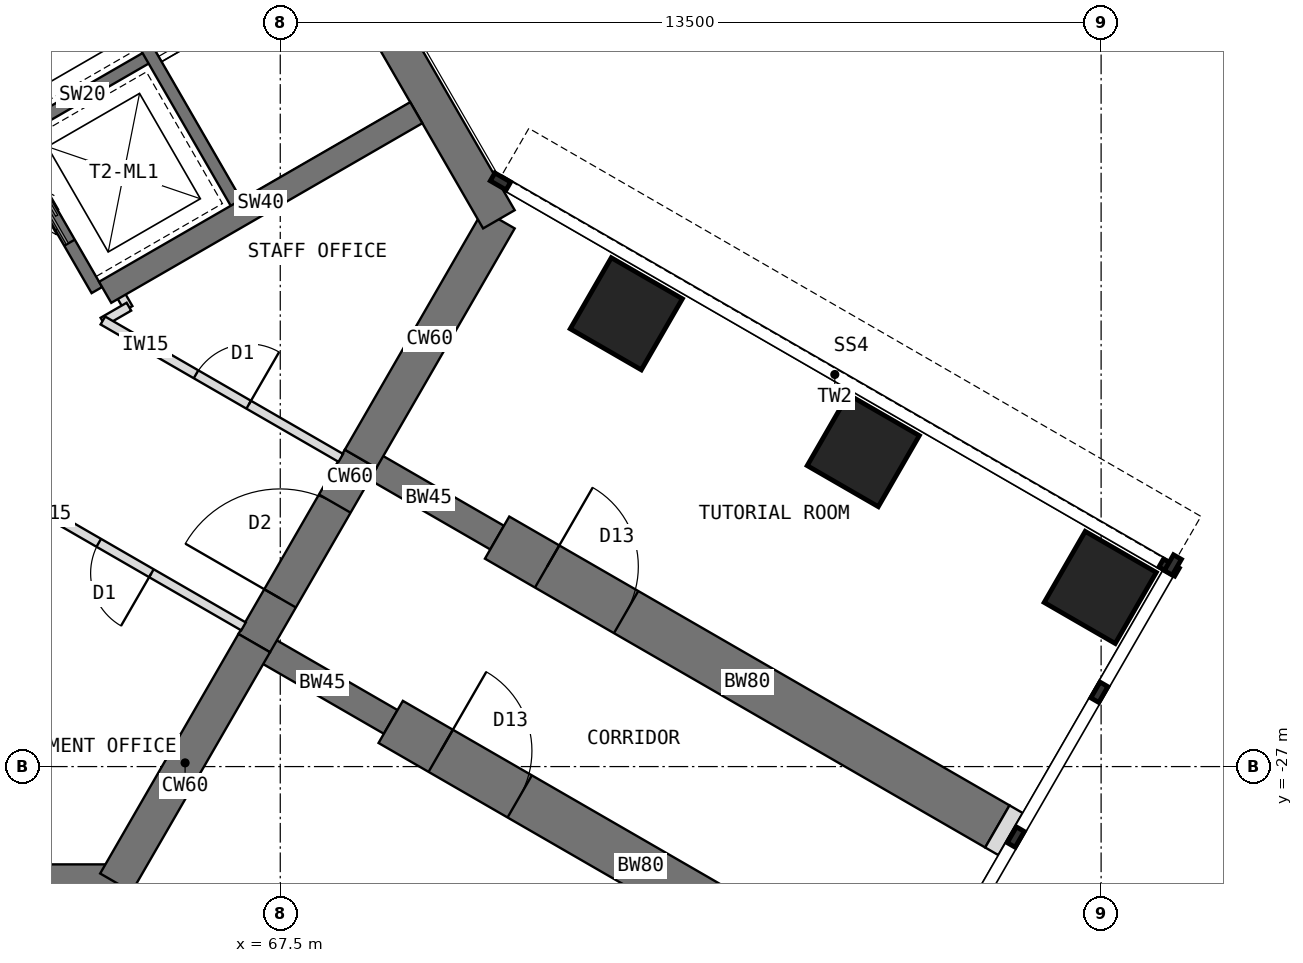
"""IFC4 building model, lengths in metres.
Left out: names, types, materials, properties, quantities, classifications, styles, units other than length and angle.
Written with IfcOpenShell. Run it as: python <this file> out.ifc"""

import sys

from ifc_helpers import new_model, si_unit, direction, frame, frame_2d, origin, origin_2d, place, context, subcontext, project, spatial, rectangle, extrude, element, fill, save


model = new_model("IFC4")
c1 = context("Model", 3, precision=1e-05, world=origin(), true_north=direction((0.0, 1.0)))
c2 = subcontext(c1, "Body", "Model", "MODEL_VIEW")
j1 = project(units=[si_unit("LENGTHUNIT", "METRE"), si_unit("PLANEANGLEUNIT", "RADIAN")], contexts=[c1])
p1 = place(None, origin())
s1 = spatial("IfcSite", under=j1, at=p1, CompositionType="ELEMENT")
p2 = place(p1, origin())
s2 = spatial("IfcBuilding", under=s1, at=p2, CompositionType="ELEMENT")
p3 = place(p2, frame((0.0, 0.0, 101.5)))
s3 = spatial("IfcBuildingStorey", under=s2, at=p3, CompositionType="ELEMENT", Elevation=101.5)
p4 = place(p3, frame((52.202, -28.908, 0.0), z_axis=(0.0, 0.0, 1.0), x_axis=(1.0, 0.0, 0.0)))
e1 = element("IfcWall", 1, at=p4, inside=s3, PredefinedType="SHEAR", context=c2, shape_type="SweptSolid", body=[
    extrude(rectangle(XDim=12.596, YDim=0.6, at=frame_2d((6.298, 0.0))), origin(), (0.0, 0.0, 1.0), 4.0),
])
p5 = place(p3, frame((64.798, -28.908, 0.0), z_axis=(0.0, 0.0, 1.0), x_axis=(0.499984222037, 0.866034513004, 0.0)))
e2 = element("IfcWall", 2, at=p5, inside=s3, PredefinedType="SHEAR", context=c2, shape_type="SweptSolid", body=[
    extrude(rectangle(XDim=4.548, YDim=0.6, at=frame_2d((2.274, 0.0))), origin(), (0.0, 0.0, 1.0), 4.0),
])
p6 = place(p3, frame((67.072, -24.97, 0.0), z_axis=(0.0, 0.0, 1.0), x_axis=(0.500010275428, 0.866019471182, 0.0)))
e3 = element("IfcWall", 3, at=p6, inside=s3, PredefinedType="SHEAR", context=c2, shape_type="SweptSolid", body=[
    extrude(rectangle(XDim=3.5, YDim=0.6, at=frame_2d((1.75, 0.0))), origin(), (0.0, 0.0, 1.0), 4.0),
])
p7 = place(p6, frame((0.85, 0.0, 0.0)))
e4 = element("IfcOpeningElement", 4, at=p7, cuts=e3, PredefinedType="OPENING", context=c2, shape_type="SweptSolid", body=[
    extrude(rectangle(XDim=1.8, YDim=2.1, at=frame_2d((0.9, 1.05))), frame((0.0, 0.31, 0.0), z_axis=(0.0, -1.0, 0.0), x_axis=(1.0, 0.0, 0.0)), (0.0, 0.0, 1.0), 0.62),
])
p8 = place(p3, frame((68.822, -21.939, 0.0), z_axis=(0.0, 0.0, 1.0), x_axis=(0.500024481964, 0.866011268655, 0.0)))
e5 = element("IfcWall", 5, at=p8, inside=s3, PredefinedType="SHEAR", context=c2, shape_type="SweptSolid", body=[
    extrude(rectangle(XDim=4.548, YDim=0.6, at=frame_2d((2.274, 0.0))), origin(), (0.0, 0.0, 1.0), 4.0),
])
p9 = place(p3, frame((71.096, -18.0, 0.0), z_axis=(0.0, 0.0, 1.0), x_axis=(-0.500005998175, 0.866021940709, 0.0)))
e6 = element("IfcWall", 6, at=p9, inside=s3, PredefinedType="SHEAR", context=c2, shape_type="SweptSolid", body=[
    extrude(rectangle(XDim=12.596, YDim=0.6, at=frame_2d((6.298, 0.0))), origin(), (0.0, 0.0, 1.0), 4.0),
])
p10 = place(p3, frame((68.822, -21.939, 0.0), z_axis=(0.0, 0.0, 1.0), x_axis=(0.866072649678, -0.499918158782, 0.0)))
e7 = element("IfcWall", 7, at=p10, inside=s3, PredefinedType="SHEAR", context=c2, shape_type="SweptSolid", body=[
    extrude(rectangle(XDim=2.592, YDim=0.45, at=frame_2d((1.296, 0.0))), origin(), (0.0, 0.0, 1.0), 4.0),
])
p11 = place(p3, frame((71.066, -23.234, 0.0), z_axis=(0.0, 0.0, 1.0), x_axis=(0.86602681393, -0.499997557548, 0.0)))
e8 = element("IfcWall", 8, at=p11, inside=s3, PredefinedType="SHEAR", context=c2, shape_type="SweptSolid", body=[
    extrude(rectangle(XDim=9.5, YDim=0.8, at=frame_2d((4.75, 0.0))), origin(), (0.0, 0.0, 1.0), 4.0),
])
p12 = place(p11, frame((0.95, 0.0, 0.0)))
e9 = element("IfcOpeningElement", 9, at=p12, cuts=e8, PredefinedType="OPENING", context=c2, shape_type="SweptSolid", body=[
    extrude(rectangle(XDim=1.5, YDim=2.1, at=frame_2d((0.75, 1.05))), frame((0.0, 0.41, 0.0), z_axis=(0.0, -1.0, 0.0), x_axis=(1.0, 0.0, 0.0)), (0.0, 0.0, 1.0), 0.82),
])
p13 = place(p3, frame((67.072, -24.97, 0.0), z_axis=(0.0, 0.0, 1.0), x_axis=(0.866031863473, -0.499988811324, 0.0)))
e10 = element("IfcWall", 10, at=p13, inside=s3, PredefinedType="SHEAR", context=c2, shape_type="SweptSolid", body=[
    extrude(rectangle(XDim=2.592, YDim=0.45, at=frame_2d((1.296, 0.0))), origin(), (0.0, 0.0, 1.0), 4.0),
])
p14 = place(p3, frame((69.316, -26.266, 0.0), z_axis=(0.0, 0.0, 1.0), x_axis=(0.86602681393, -0.499997557548, 0.0)))
e11 = element("IfcWall", 11, at=p14, inside=s3, PredefinedType="SHEAR", context=c2, shape_type="SweptSolid", body=[
    extrude(rectangle(XDim=9.5, YDim=0.8, at=frame_2d((4.75, 0.0))), origin(), (0.0, 0.0, 1.0), 4.0),
])
p15 = place(p14, frame((0.95, 0.0, 0.0)))
e12 = element("IfcOpeningElement", 12, at=p15, cuts=e11, PredefinedType="OPENING", context=c2, shape_type="SweptSolid", body=[
    extrude(rectangle(XDim=1.5, YDim=2.1, at=frame_2d((0.75, 1.05))), frame((0.0, 0.41, 0.0), z_axis=(0.0, -1.0, 0.0), x_axis=(1.0, 0.0, 0.0)), (0.0, 0.0, 1.0), 0.82),
])
for number, where, z_axis, x_axis in (
    (13, (73.191, -19.554, 0.0), (0.0, 0.0, 1.0), (0.5, 0.866, 0.0)),
    (14, (77.088, -21.804, 0.0), (0.0, 0.0, 1.0), (0.5, 0.866, 0.0)),
    (15, (80.986, -24.054, 0.0), (0.0, 0.0, 1.0), (0.5, 0.866, 0.0)),
):
    element("IfcColumn", number, at=place(p3, frame(where, z_axis=z_axis, x_axis=x_axis)), inside=s3, PredefinedType="COLUMN", context=c2, shape_type="SweptSolid", body=[
        extrude(rectangle(XDim=1.35, YDim=1.35, at=origin_2d()), origin(), (0.0, 0.0, 1.0), 4.0),
    ])
p16 = place(p3, frame((79.294, -27.984, 0.0), z_axis=(0.0, 0.0, 1.0), x_axis=(0.865827443207, -0.500342721131, 0.0)))
e16 = element("IfcWall", 16, at=p16, inside=s3, PredefinedType="PARTITIONING", context=c2, shape_type="SweptSolid", body=[
    extrude(rectangle(XDim=0.25, YDim=0.8, at=frame_2d((0.125, 0.0))), origin(), (0.0, 0.0, 1.0), 3.8),
])
p17 = place(p3, frame((64.484, -19.164, 0.0), z_axis=(0.0, 0.0, 1.0), x_axis=(-0.49999894854, 0.866026010844, 0.0)))
e17 = element("IfcWall", 17, at=p17, inside=s3, PredefinedType="SHEAR", context=c2, shape_type="SweptSolid", body=[
    extrude(rectangle(XDim=8.0, YDim=0.2, at=frame_2d((4.0, 0.0))), origin(), (0.0, 0.0, 1.0), 4.0),
])
p18 = place(p17, frame((6.3, 0.0, 0.0)))
e18 = element("IfcOpeningElement", 18, at=p18, cuts=e17, PredefinedType="OPENING", context=c2, shape_type="SweptSolid", body=[
    extrude(rectangle(XDim=1.2, YDim=2.1, at=frame_2d((0.6, 1.05))), frame((0.0, 0.11, 0.0), z_axis=(0.0, -1.0, 0.0), x_axis=(1.0, 0.0, 0.0)), (0.0, 0.0, 1.0), 0.22),
])
p19 = place(p17, frame((0.9, 0.0, 0.0)))
e19 = element("IfcOpeningElement", 19, at=p19, cuts=e17, PredefinedType="OPENING", context=c2, shape_type="SweptSolid", body=[
    extrude(rectangle(XDim=1.1, YDim=2.2, at=frame_2d((0.55, 1.1))), frame((0.0, 0.11, 0.0), z_axis=(0.0, -1.0, 0.0), x_axis=(1.0, 0.0, 0.0)), (0.0, 0.0, 1.0), 0.22),
])
p20 = place(p17, frame((3.8, 0.0, 0.0)))
e20 = element("IfcOpeningElement", 20, at=p20, cuts=e17, PredefinedType="OPENING", context=c2, shape_type="SweptSolid", body=[
    extrude(rectangle(XDim=1.1, YDim=2.2, at=frame_2d((0.55, 1.1))), frame((0.0, 0.11, 0.0), z_axis=(0.0, -1.0, 0.0), x_axis=(1.0, 0.0, 0.0)), (0.0, 0.0, 1.0), 0.22),
])
p21 = place(p3, frame((63.12, -16.603, 0.0), z_axis=(0.0, 0.0, 1.0), x_axis=(0.866062058628, 0.499936506574, 0.0)))
e21 = element("IfcWall", 21, at=p21, inside=s3, PredefinedType="SHEAR", context=c2, shape_type="SweptSolid", body=[
    extrude(rectangle(XDim=2.6, YDim=0.2, at=frame_2d((1.3, 0.0))), origin(), (0.0, 0.0, 1.0), 4.0),
])
p22 = place(p3, frame((66.822, -17.814, 0.0), z_axis=(0.0, 0.0, 1.0), x_axis=(-0.49999894854, 0.866026010844, 0.0)))
e22 = element("IfcWall", 22, at=p22, inside=s3, PredefinedType="SHEAR", context=c2, shape_type="SweptSolid", body=[
    extrude(rectangle(XDim=8.0, YDim=0.2, at=frame_2d((4.0, 0.0))), origin(), (0.0, 0.0, 1.0), 4.0),
])
p23 = place(p22, frame((6.7, 0.0, 0.0)))
e23 = element("IfcOpeningElement", 23, at=p23, cuts=e22, PredefinedType="OPENING", context=c2, shape_type="SweptSolid", body=[
    extrude(rectangle(XDim=1.1, YDim=2.1, at=frame_2d((0.55, 1.05))), frame((0.0, 0.11, 0.0), z_axis=(0.0, -1.0, 0.0), x_axis=(1.0, 0.0, 0.0)), (0.0, 0.0, 1.0), 0.22),
])
p24 = place(p3, frame((64.62, -19.201, 0.0), z_axis=(0.0, 0.0, 1.0), x_axis=(0.866027317282, 0.49999668571, 0.0)))
e24 = element("IfcWall", 24, at=p24, inside=s3, PredefinedType="SHEAR", context=c2, shape_type="SweptSolid", body=[
    extrude(rectangle(XDim=5.908, YDim=0.4, at=frame_2d((2.954, 0.0))), origin(), (0.0, 0.0, 1.0), 4.0),
])
p25 = place(p3, frame((64.789, -19.092, 0.0), z_axis=(0.0, 0.0, 1.0), x_axis=(0.499804398801, -0.866138304741, 0.0)))
e25 = element("IfcWall", 25, at=p25, inside=s3, PredefinedType="PARTITIONING", context=c2, shape_type="SweptSolid", body=[
    extrude(rectangle(XDim=0.43, YDim=0.15, at=frame_2d((0.215, 0.0))), origin(), (0.0, 0.0, 1.0), 3.8),
])
p26 = place(p3, frame((65.011, -19.437, 0.0), z_axis=(0.0, 0.0, 1.0), x_axis=(-0.865831790172, -0.50033519877, 0.0)))
e26 = element("IfcWall", 26, at=p26, inside=s3, PredefinedType="PARTITIONING", context=c2, shape_type="SweptSolid", body=[
    extrude(rectangle(XDim=0.494, YDim=0.15, at=frame_2d((0.247, 0.0))), origin(), (0.0, 0.0, 1.0), 3.8),
])
p27 = place(p3, frame((64.583, -19.664, 0.0), z_axis=(0.0, 0.0, 1.0), x_axis=(0.866006515865, -0.500032713409, 0.0)))
e27 = element("IfcWall", 27, at=p27, inside=s3, PredefinedType="PARTITIONING", context=c2, shape_type="SweptSolid", body=[
    extrude(rectangle(XDim=4.518, YDim=0.15, at=frame_2d((2.259, 0.0))), origin(), (0.0, 0.0, 1.0), 3.8),
])
p28 = place(p27, frame((1.769, 0.0, 0.0)))
e28 = element("IfcOpeningElement", 28, at=p28, cuts=e27, PredefinedType="OPENING", context=c2, shape_type="SweptSolid", body=[
    extrude(rectangle(XDim=1.0, YDim=2.1, at=frame_2d((0.5, 1.05))), frame((0.0, 0.085, 0.0), z_axis=(0.0, -1.0, 0.0), x_axis=(1.0, 0.0, 0.0)), (0.0, 0.0, 1.0), 0.17),
])
p29 = place(p3, frame((66.896, -24.695, 0.0), z_axis=(0.0, 0.0, 1.0), x_axis=(-0.86602002524, 0.500009315796, 0.0)))
e29 = element("IfcWall", 29, at=p29, inside=s3, PredefinedType="PARTITIONING", context=c2, shape_type="SweptSolid", body=[
    extrude(rectangle(XDim=4.519, YDim=0.15, at=frame_2d((2.259, 0.0))), origin(), (0.0, 0.0, 1.0), 3.8),
])
p30 = place(p29, frame((1.749, 0.0, 0.0)))
e30 = element("IfcOpeningElement", 30, at=p30, cuts=e29, PredefinedType="OPENING", context=c2, shape_type="SweptSolid", body=[
    extrude(rectangle(XDim=1.0, YDim=2.1, at=frame_2d((0.5, 1.05))), frame((0.0, 0.085, 0.0), z_axis=(0.0, -1.0, 0.0), x_axis=(1.0, 0.0, 0.0)), (0.0, 0.0, 1.0), 0.17),
])
p31 = place(p19, origin())
e31 = element("IfcDoor", 31, at=p31, inside=s3, OperationType="DOUBLE_DOOR_SLIDING", PredefinedType="DOOR", context=c2, shape_type="SweptSolid", body=[
    extrude(rectangle(XDim=1.1, YDim=2.2, at=frame_2d((0.55, 1.1))), frame((0.0, 0.025, 0.0), z_axis=(0.0, -1.0, 0.0), x_axis=(1.0, 0.0, 0.0)), (0.0, 0.0, 1.0), 0.05),
])
fill(e19, e31)
p32 = place(p7, origin())
e32 = element("IfcDoor", 32, at=p32, inside=s3, OperationType="DOUBLE_DOOR_DOUBLE_SWING", PredefinedType="DOOR", context=c2, shape_type="SweptSolid", body=[
    extrude(rectangle(XDim=1.72, YDim=2.06, at=frame_2d((0.9, 1.03))), frame((0.0, 0.025, 0.0), z_axis=(0.0, -1.0, 0.0), x_axis=(1.0, 0.0, 0.0)), (0.0, 0.0, 1.0), 0.05),
    extrude(rectangle(XDim=0.04, YDim=2.1, at=frame_2d((0.02, 1.05))), frame((0.0, 0.3, 0.0), z_axis=(0.0, -1.0, 0.0), x_axis=(1.0, 0.0, 0.0)), (0.0, 0.0, 1.0), 0.6),
    extrude(rectangle(XDim=0.04, YDim=2.1, at=frame_2d((1.78, 1.05))), frame((0.0, 0.3, 0.0), z_axis=(0.0, -1.0, 0.0), x_axis=(1.0, 0.0, 0.0)), (0.0, 0.0, 1.0), 0.6),
    extrude(rectangle(XDim=1.72, YDim=0.04, at=frame_2d((0.9, 2.08))), frame((0.0, 0.3, 0.0), z_axis=(0.0, -1.0, 0.0), x_axis=(1.0, 0.0, 0.0)), (0.0, 0.0, 1.0), 0.6),
])
fill(e4, e32)
p33 = place(p30, origin())
e33 = element("IfcDoor", 33, at=p33, inside=s3, OperationType="SINGLE_SWING_LEFT", PredefinedType="DOOR", context=c2, shape_type="SweptSolid", body=[
    extrude(rectangle(XDim=1.0, YDim=2.1, at=frame_2d((0.5, 1.05))), frame((0.0, 0.025, 0.0), z_axis=(0.0, -1.0, 0.0), x_axis=(1.0, 0.0, 0.0)), (0.0, 0.0, 1.0), 0.05),
])
fill(e30, e33)
p34 = place(p28, origin())
e34 = element("IfcDoor", 34, at=p34, inside=s3, OperationType="SINGLE_SWING_RIGHT", PredefinedType="DOOR", context=c2, shape_type="SweptSolid", body=[
    extrude(rectangle(XDim=1.0, YDim=2.1, at=frame_2d((0.5, 1.05))), frame((0.0, 0.025, 0.0), z_axis=(0.0, -1.0, 0.0), x_axis=(1.0, 0.0, 0.0)), (0.0, 0.0, 1.0), 0.05),
])
fill(e28, e34)
p35 = place(p12, origin())
e35 = element("IfcDoor", 35, at=p35, inside=s3, OperationType="DOUBLE_DOOR_SINGLE_SWING", PredefinedType="DOOR", context=c2, shape_type="SweptSolid", body=[
    extrude(rectangle(XDim=1.42, YDim=2.06, at=frame_2d((0.75, 1.03))), frame((0.0, 0.025, 0.0), z_axis=(0.0, -1.0, 0.0), x_axis=(1.0, 0.0, 0.0)), (0.0, 0.0, 1.0), 0.05),
    extrude(rectangle(XDim=0.04, YDim=2.1, at=frame_2d((0.02, 1.05))), frame((0.0, 0.4, 0.0), z_axis=(0.0, -1.0, 0.0), x_axis=(1.0, 0.0, 0.0)), (0.0, 0.0, 1.0), 0.8),
    extrude(rectangle(XDim=0.04, YDim=2.1, at=frame_2d((1.48, 1.05))), frame((0.0, 0.4, 0.0), z_axis=(0.0, -1.0, 0.0), x_axis=(1.0, 0.0, 0.0)), (0.0, 0.0, 1.0), 0.8),
    extrude(rectangle(XDim=1.42, YDim=0.04, at=frame_2d((0.75, 2.08))), frame((0.0, 0.4, 0.0), z_axis=(0.0, -1.0, 0.0), x_axis=(1.0, 0.0, 0.0)), (0.0, 0.0, 1.0), 0.8),
])
fill(e9, e35)
p36 = place(p15, origin())
e36 = element("IfcDoor", 36, at=p36, inside=s3, OperationType="DOUBLE_DOOR_SINGLE_SWING", PredefinedType="DOOR", context=c2, shape_type="SweptSolid", body=[
    extrude(rectangle(XDim=1.42, YDim=2.06, at=frame_2d((0.75, 1.03))), frame((0.0, 0.025, 0.0), z_axis=(0.0, -1.0, 0.0), x_axis=(1.0, 0.0, 0.0)), (0.0, 0.0, 1.0), 0.05),
    extrude(rectangle(XDim=0.04, YDim=2.1, at=frame_2d((0.02, 1.05))), frame((0.0, 0.4, 0.0), z_axis=(0.0, -1.0, 0.0), x_axis=(1.0, 0.0, 0.0)), (0.0, 0.0, 1.0), 0.8),
    extrude(rectangle(XDim=0.04, YDim=2.1, at=frame_2d((1.48, 1.05))), frame((0.0, 0.4, 0.0), z_axis=(0.0, -1.0, 0.0), x_axis=(1.0, 0.0, 0.0)), (0.0, 0.0, 1.0), 0.8),
    extrude(rectangle(XDim=1.42, YDim=0.04, at=frame_2d((0.75, 2.08))), frame((0.0, 0.4, 0.0), z_axis=(0.0, -1.0, 0.0), x_axis=(1.0, 0.0, 0.0)), (0.0, 0.0, 1.0), 0.8),
])
fill(e12, e36)
save(model, sys.argv[1])
